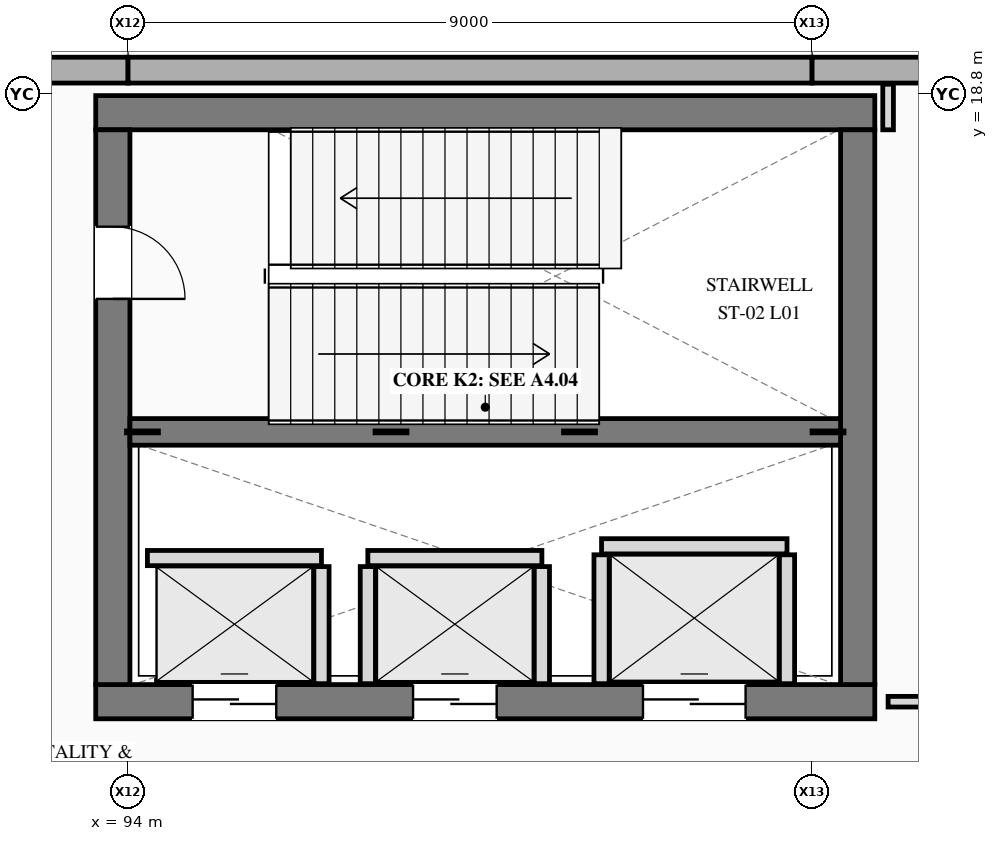
"""IFC4 building model, lengths in metres.
Left out: names, types, materials, properties, quantities, classifications, styles, units other than length and angle.
Written with IfcOpenShell. Run it as: python <this file> out.ifc"""

import sys

from ifc_helpers import new_model, si_unit, direction, frame, frame_2d, origin, place, context, subcontext, project, spatial, rectangle, extrude, element, fill, save


model = new_model("IFC4")
c1 = context("Model", 3, precision=1e-05, world=origin(), true_north=direction((0.0, 1.0)))
c2 = subcontext(c1, "Body", "Model", "MODEL_VIEW")
j1 = project(units=[si_unit("LENGTHUNIT", "METRE"), si_unit("PLANEANGLEUNIT", "RADIAN")], contexts=[c1])
p1 = place(None, origin())
s1 = spatial("IfcSite", under=j1, at=p1, CompositionType="ELEMENT")
p2 = place(p1, origin())
s2 = spatial("IfcBuilding", under=s1, at=p2, CompositionType="ELEMENT")
p3 = place(p2, frame((0.0, 0.0, 5.4)))
s3 = spatial("IfcBuildingStorey", under=s2, at=p3, CompositionType="ELEMENT", Elevation=5.4)
for number, where, z_axis, x_axis in (
    (1, (94.0, 19.11, 0.0), (0.0, 0.0, 1.0), (-1.0, 0.0, 0.0)),
    (2, (103.0, 19.11, 0.0), (0.0, 0.0, 1.0), (-1.0, 0.0, 0.0)),
):
    element("IfcWall", number, at=place(p3, frame(where, z_axis=z_axis, x_axis=x_axis)), inside=s3, PredefinedType="STANDARD", context=c2, shape_type="SweptSolid", body=[
        extrude(rectangle(XDim=9.0, YDim=0.34, at=frame_2d((4.5, 0.0))), origin(), (0.0, 0.0, 1.0), 5.4),
    ])
p4 = place(p3, frame((112.0, 19.11, 0.0), z_axis=(0.0, 0.0, 1.0), x_axis=(-1.0, 0.0, 0.0)))
e3 = element("IfcWall", 3, at=p4, inside=s3, PredefinedType="STANDARD", context=c2, shape_type="SweptSolid", body=[
    extrude(rectangle(XDim=9.0, YDim=0.34, at=frame_2d((4.5, 0.0))), origin(), (0.0, 0.0, 1.0), 5.4),
])
p5 = place(p4, frame((3.45, 0.0, 0.88)))
e4 = element("IfcOpeningElement", 4, at=p5, cuts=e3, PredefinedType="OPENING", context=c2, shape_type="SweptSolid", body=[
    extrude(rectangle(XDim=2.1, YDim=1.9, at=frame_2d((1.05, 0.95))), frame((0.0, 0.18, 0.0), z_axis=(0.0, -1.0, 0.0), x_axis=(1.0, 0.0, 0.0)), (0.0, 0.0, 1.0), 0.36),
])
p6 = place(p3, frame((93.575, 10.8, 0.0), z_axis=(0.0, 0.0, 1.0), x_axis=(1.0, 0.0, 0.0)))
e5 = element("IfcWall", 5, at=p6, inside=s3, PredefinedType="SHEAR", context=c2, shape_type="SweptSolid", body=[
    extrude(rectangle(XDim=10.25, YDim=0.45, at=frame_2d((5.125, 0.0))), origin(), (0.0, 0.0, 1.0), 5.4),
])
p7 = place(p6, frame((1.275, 0.0, 0.0)))
e6 = element("IfcOpeningElement", 6, at=p7, cuts=e5, PredefinedType="OPENING", context=c2, shape_type="SweptSolid", body=[
    extrude(rectangle(XDim=1.1, YDim=2.2, at=frame_2d((0.55, 1.1))), frame((0.0, 0.235, 0.0), z_axis=(0.0, -1.0, 0.0), x_axis=(1.0, 0.0, 0.0)), (0.0, 0.0, 1.0), 0.47),
])
p8 = place(p6, frame((4.175, 0.0, 0.0)))
e7 = element("IfcOpeningElement", 7, at=p8, cuts=e5, PredefinedType="OPENING", context=c2, shape_type="SweptSolid", body=[
    extrude(rectangle(XDim=1.1, YDim=2.2, at=frame_2d((0.55, 1.1))), frame((0.0, 0.235, 0.0), z_axis=(0.0, -1.0, 0.0), x_axis=(1.0, 0.0, 0.0)), (0.0, 0.0, 1.0), 0.47),
])
p9 = place(p6, frame((7.2, 0.0, 0.0)))
e8 = element("IfcOpeningElement", 8, at=p9, cuts=e5, PredefinedType="OPENING", context=c2, shape_type="SweptSolid", body=[
    extrude(rectangle(XDim=1.35, YDim=2.3, at=frame_2d((0.675, 1.15))), frame((0.0, 0.235, 0.0), z_axis=(0.0, -1.0, 0.0), x_axis=(1.0, 0.0, 0.0)), (0.0, 0.0, 1.0), 0.47),
])
p10 = place(p3, frame((103.825, 18.55, 0.0), z_axis=(0.0, 0.0, 1.0), x_axis=(-1.0, 0.0, 0.0)))
e9 = element("IfcWall", 9, at=p10, inside=s3, PredefinedType="SHEAR", context=c2, shape_type="SweptSolid", body=[
    extrude(rectangle(XDim=10.25, YDim=0.45, at=frame_2d((5.125, 0.0))), origin(), (0.0, 0.0, 1.0), 5.4),
])
p11 = place(p3, frame((93.8, 18.325, 0.0), z_axis=(0.0, 0.0, 1.0), x_axis=(0.0, -1.0, 0.0)))
e10 = element("IfcWall", 10, at=p11, inside=s3, PredefinedType="SHEAR", context=c2, shape_type="SweptSolid", body=[
    extrude(rectangle(XDim=7.3, YDim=0.45, at=frame_2d((3.65, 0.0))), origin(), (0.0, 0.0, 1.0), 5.4),
])
p12 = place(p11, frame((1.275, 0.0, 0.0)))
e11 = element("IfcOpeningElement", 11, at=p12, cuts=e10, PredefinedType="OPENING", context=c2, shape_type="SweptSolid", body=[
    extrude(rectangle(XDim=0.95, YDim=2.2, at=frame_2d((0.475, 1.1))), frame((0.0, 0.235, 0.0), z_axis=(0.0, -1.0, 0.0), x_axis=(1.0, 0.0, 0.0)), (0.0, 0.0, 1.0), 0.47),
])
p13 = place(p3, frame((103.6, 11.025, 0.0), z_axis=(0.0, 0.0, 1.0), x_axis=(0.0, 1.0, 0.0)))
e12 = element("IfcWall", 12, at=p13, inside=s3, PredefinedType="SHEAR", context=c2, shape_type="SweptSolid", body=[
    extrude(rectangle(XDim=7.3, YDim=0.45, at=frame_2d((3.65, 0.0))), origin(), (0.0, 0.0, 1.0), 5.4),
])
p14 = place(p3, frame((94.025, 14.35, 0.0), z_axis=(0.0, 0.0, 1.0), x_axis=(1.0, 0.0, 0.0)))
e13 = element("IfcWall", 13, at=p14, inside=s3, PredefinedType="SHEAR", context=c2, shape_type="SweptSolid", body=[
    extrude(rectangle(XDim=9.35, YDim=0.35, at=frame_2d((4.675, 0.0))), origin(), (0.0, 0.0, 1.0), 5.4),
])
p15 = place(p3, frame((94.255, 12.69, 0.0), z_axis=(0.0, 0.0, 1.0), x_axis=(1.0, 0.0, 0.0)))
e14 = element("IfcWall", 14, at=p15, inside=s3, PredefinedType="PLUMBINGWALL", context=c2, shape_type="SweptSolid", body=[
    extrude(rectangle(XDim=2.29, YDim=0.2, at=frame_2d((1.145, 0.0))), origin(), (0.0, 0.0, 1.0), 5.095),
])
p16 = place(p3, frame((96.545, 11.037, 0.0), z_axis=(0.0, 0.0, 1.0), x_axis=(0.0, 1.0, 0.0)))
e15 = element("IfcWall", 15, at=p16, inside=s3, PredefinedType="PLUMBINGWALL", context=c2, shape_type="SweptSolid", body=[
    extrude(rectangle(XDim=1.541, YDim=0.2, at=frame_2d((0.771, 0.0))), origin(), (0.0, 0.0, 1.0), 5.095),
])
p17 = place(p3, frame((97.155, 12.69, 0.0), z_axis=(0.0, 0.0, 1.0), x_axis=(1.0, 0.0, 0.0)))
e16 = element("IfcWall", 16, at=p17, inside=s3, PredefinedType="PLUMBINGWALL", context=c2, shape_type="SweptSolid", body=[
    extrude(rectangle(XDim=2.29, YDim=0.2, at=frame_2d((1.145, 0.0))), origin(), (0.0, 0.0, 1.0), 5.095),
])
for number, where, z_axis, x_axis in (
    (17, (97.155, 11.037, 0.0), (0.0, 0.0, 1.0), (0.0, 1.0, 0.0)),
    (18, (99.445, 11.037, 0.0), (0.0, 0.0, 1.0), (0.0, 1.0, 0.0)),
):
    element("IfcWall", number, at=place(p3, frame(where, z_axis=z_axis, x_axis=x_axis)), inside=s3, PredefinedType="PLUMBINGWALL", context=c2, shape_type="SweptSolid", body=[
        extrude(rectangle(XDim=1.541, YDim=0.2, at=frame_2d((0.771, 0.0))), origin(), (0.0, 0.0, 1.0), 5.095),
    ])
p18 = place(p3, frame((100.23, 12.845, 0.0), z_axis=(0.0, 0.0, 1.0), x_axis=(1.0, 0.0, 0.0)))
e19 = element("IfcWall", 19, at=p18, inside=s3, PredefinedType="PLUMBINGWALL", context=c2, shape_type="SweptSolid", body=[
    extrude(rectangle(XDim=2.44, YDim=0.2, at=frame_2d((1.22, 0.0))), origin(), (0.0, 0.0, 1.0), 5.095),
])
for number, where, z_axis, x_axis in (
    (20, (100.23, 11.037, 0.0), (0.0, 0.0, 1.0), (0.0, 1.0, 0.0)),
    (21, (102.67, 11.037, 0.0), (0.0, 0.0, 1.0), (0.0, 1.0, 0.0)),
):
    element("IfcWall", number, at=place(p3, frame(where, z_axis=z_axis, x_axis=x_axis)), inside=s3, PredefinedType="PLUMBINGWALL", context=c2, shape_type="SweptSolid", body=[
        extrude(rectangle(XDim=1.696, YDim=0.2, at=frame_2d((0.848, 0.0))), origin(), (0.0, 0.0, 1.0), 5.095),
    ])
p19 = place(p3, frame((104.0, 10.8, 0.0), z_axis=(0.0, 0.0, 1.0), x_axis=(1.0, 0.0, 0.0)))
e22 = element("IfcWall", 22, at=p19, inside=s3, PredefinedType="PARTITIONING", context=c2, shape_type="SweptSolid", body=[
    extrude(rectangle(XDim=32.2, YDim=0.14, at=frame_2d((16.1, 0.0))), origin(), (0.0, 0.0, 1.0), 4.424),
])
p20 = place(p19, frame((13.2, 0.0, 0.0)))
e23 = element("IfcOpeningElement", 23, at=p20, cuts=e22, PredefinedType="OPENING", context=c2, shape_type="SweptSolid", body=[
    extrude(rectangle(XDim=1.6, YDim=2.4, at=frame_2d((0.8, 1.2))), frame((0.0, 0.08, 0.0), z_axis=(0.0, -1.0, 0.0), x_axis=(1.0, 0.0, 0.0)), (0.0, 0.0, 1.0), 0.16),
])
p21 = place(p3, frame((104.0, 18.325, 0.0), z_axis=(0.0, 0.0, 1.0), x_axis=(0.0, 1.0, 0.0)))
e24 = element("IfcWall", 24, at=p21, inside=s3, PredefinedType="PARTITIONING", context=c2, shape_type="SweptSolid", body=[
    extrude(rectangle(XDim=0.6, YDim=0.14, at=frame_2d((0.3, 0.0))), origin(), (0.0, 0.0, 1.0), 5.095),
])
p22 = place(p12, origin())
e25 = element("IfcDoor", 25, at=p22, inside=s3, OperationType="SINGLE_SWING_RIGHT", PredefinedType="DOOR", context=c2, shape_type="SweptSolid", body=[
    extrude(rectangle(XDim=0.95, YDim=2.2, at=frame_2d((0.475, 1.1))), frame((0.0, 0.025, 0.0), z_axis=(0.0, -1.0, 0.0), x_axis=(1.0, 0.0, 0.0)), (0.0, 0.0, 1.0), 0.05),
])
fill(e11, e25)
p23 = place(p7, origin())
e26 = element("IfcDoor", 26, at=p23, inside=s3, OperationType="SLIDING_TO_LEFT", PredefinedType="DOOR", context=c2, shape_type="SweptSolid", body=[
    extrude(rectangle(XDim=1.1, YDim=2.2, at=frame_2d((0.55, 1.1))), frame((0.0, 0.025, 0.0), z_axis=(0.0, -1.0, 0.0), x_axis=(1.0, 0.0, 0.0)), (0.0, 0.0, 1.0), 0.05),
])
fill(e6, e26)
p24 = place(p8, origin())
e27 = element("IfcDoor", 27, at=p24, inside=s3, OperationType="SLIDING_TO_RIGHT", PredefinedType="DOOR", context=c2, shape_type="SweptSolid", body=[
    extrude(rectangle(XDim=1.1, YDim=2.2, at=frame_2d((0.55, 1.1))), frame((0.0, 0.025, 0.0), z_axis=(0.0, -1.0, 0.0), x_axis=(1.0, 0.0, 0.0)), (0.0, 0.0, 1.0), 0.05),
])
fill(e7, e27)
p25 = place(p9, origin())
e28 = element("IfcDoor", 28, at=p25, inside=s3, OperationType="SLIDING_TO_LEFT", PredefinedType="DOOR", context=c2, shape_type="SweptSolid", body=[
    extrude(rectangle(XDim=1.35, YDim=2.3, at=frame_2d((0.675, 1.15))), frame((0.0, 0.025, 0.0), z_axis=(0.0, -1.0, 0.0), x_axis=(1.0, 0.0, 0.0)), (0.0, 0.0, 1.0), 0.05),
])
fill(e8, e28)
save(model, sys.argv[1])
